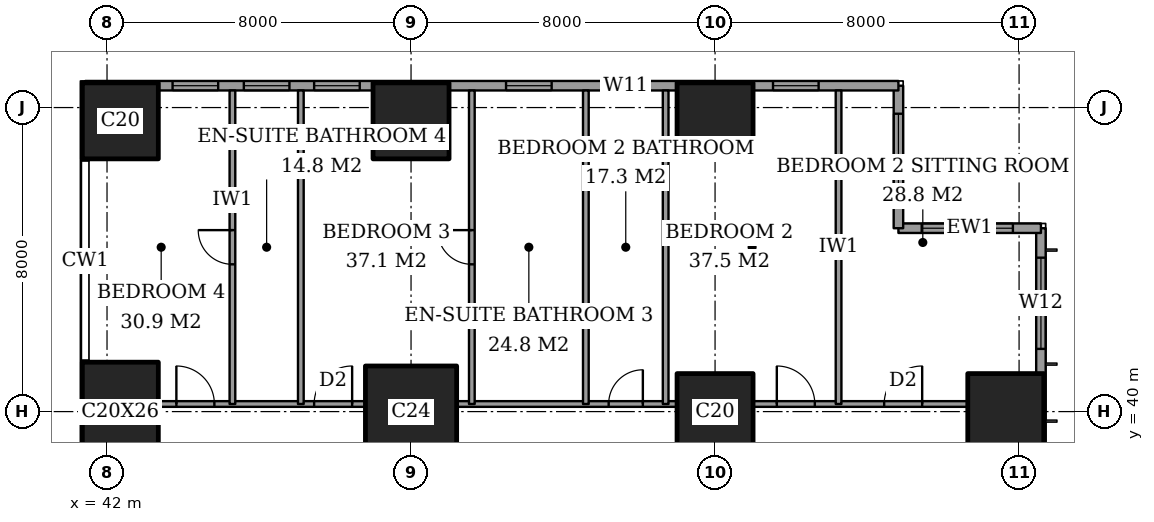
"""IFC4 building model, lengths in metres.
Left out: names, types, materials, properties, quantities, classifications, styles, units other than length and angle.
Written with IfcOpenShell. Run it as: python <this file> out.ifc"""

import sys

from ifc_helpers import new_model, si_unit, direction, frame, frame_2d, origin, origin_2d, place, context, subcontext, project, spatial, rectangle, extrude, element, fill, save


model = new_model("IFC4")
c1 = context("Model", 3, precision=1e-05, world=origin(), true_north=direction((0.0, 1.0)))
c2 = subcontext(c1, "Body", "Model", "MODEL_VIEW")
j1 = project(units=[si_unit("LENGTHUNIT", "METRE"), si_unit("PLANEANGLEUNIT", "RADIAN")], contexts=[c1])
p1 = place(None, origin())
s1 = spatial("IfcSite", under=j1, at=p1, CompositionType="ELEMENT")
p2 = place(p1, origin())
s2 = spatial("IfcBuilding", under=s1, at=p2, CompositionType="ELEMENT")
p3 = place(p2, frame((0.0, 0.0, 157.4)))
s3 = spatial("IfcBuildingStorey", under=s2, at=p3, CompositionType="ELEMENT", Elevation=157.4)
p4 = place(p3, frame((42.35, 40.0, 0.0), z_axis=(0.0, 0.0, 1.0), x_axis=(1.0, 0.0, 0.0)))
e1 = element("IfcColumn", 1, at=p4, inside=s3, PredefinedType="COLUMN", context=c2, shape_type="SweptSolid", body=[
    extrude(rectangle(XDim=2.0, YDim=2.6, at=origin_2d()), origin(), (0.0, 0.0, 1.0), 3.6),
])
p5 = place(p3, frame((42.35, 47.65, 0.0), z_axis=(0.0, 0.0, 1.0), x_axis=(1.0, 0.0, 0.0)))
e2 = element("IfcColumn", 2, at=p5, inside=s3, PredefinedType="COLUMN", context=c2, shape_type="SweptSolid", body=[
    extrude(rectangle(XDim=2.0, YDim=2.0, at=origin_2d()), origin(), (0.0, 0.0, 1.0), 3.6),
])
p6 = place(p3, frame((50.0, 40.0, 0.0), z_axis=(0.0, 0.0, 1.0), x_axis=(1.0, 0.0, 0.0)))
e3 = element("IfcColumn", 3, at=p6, inside=s3, PredefinedType="COLUMN", context=c2, shape_type="SweptSolid", body=[
    extrude(rectangle(XDim=2.4, YDim=2.4, at=origin_2d()), origin(), (0.0, 0.0, 1.0), 3.6),
])
for number, where, z_axis, x_axis in (
    (4, (50.0, 47.65, 0.0), (0.0, 0.0, 1.0), (1.0, 0.0, 0.0)),
    (5, (58.0, 40.0, 0.0), (0.0, 0.0, 1.0), (1.0, 0.0, 0.0)),
    (6, (58.0, 47.65, 0.0), (0.0, 0.0, 1.0), (1.0, 0.0, 0.0)),
    (7, (65.65, 40.0, 0.0), (0.0, 0.0, 1.0), (1.0, 0.0, 0.0)),
):
    element("IfcColumn", number, at=place(p3, frame(where, z_axis=z_axis, x_axis=x_axis)), inside=s3, PredefinedType="COLUMN", context=c2, shape_type="SweptSolid", body=[
        extrude(rectangle(XDim=2.0, YDim=2.0, at=origin_2d()), origin(), (0.0, 0.0, 1.0), 3.6),
    ])
p7 = place(p3, frame((66.575, 3.175, 0.0), z_axis=(0.0, 0.0, 1.0), x_axis=(0.0, 1.0, 0.0)))
e8 = element("IfcWall", 8, at=p7, inside=s3, PredefinedType="SOLIDWALL", context=c2, shape_type="SweptSolid", body=[
    extrude(rectangle(XDim=41.65, YDim=0.25, at=frame_2d((20.825, 0.0))), origin(), (0.0, 0.0, 1.0), 3.6),
])
p8 = place(p7, frame((0.775, 0.0, 0.4)))
e9 = element("IfcOpeningElement", 9, at=p8, cuts=e8, PredefinedType="OPENING", context=c2, shape_type="SweptSolid", body=[
    extrude(rectangle(XDim=2.4, YDim=2.2, at=frame_2d((1.2, 1.1))), frame((0.0, 0.135, 0.0), z_axis=(0.0, -1.0, 0.0), x_axis=(1.0, 0.0, 0.0)), (0.0, 0.0, 1.0), 0.27),
])
p9 = place(p7, frame((6.225, 0.0, 0.4)))
e10 = element("IfcOpeningElement", 10, at=p9, cuts=e8, PredefinedType="OPENING", context=c2, shape_type="SweptSolid", body=[
    extrude(rectangle(XDim=1.2, YDim=2.2, at=frame_2d((0.6, 1.1))), frame((0.0, 0.135, 0.0), z_axis=(0.0, -1.0, 0.0), x_axis=(1.0, 0.0, 0.0)), (0.0, 0.0, 1.0), 0.27),
])
p10 = place(p7, frame((8.475, 0.0, 0.4)))
e11 = element("IfcOpeningElement", 11, at=p10, cuts=e8, PredefinedType="OPENING", context=c2, shape_type="SweptSolid", body=[
    extrude(rectangle(XDim=2.4, YDim=2.2, at=frame_2d((1.2, 1.1))), frame((0.0, 0.135, 0.0), z_axis=(0.0, -1.0, 0.0), x_axis=(1.0, 0.0, 0.0)), (0.0, 0.0, 1.0), 0.27),
])
p11 = place(p7, frame((15.775, 0.0, 0.4)))
e12 = element("IfcOpeningElement", 12, at=p11, cuts=e8, PredefinedType="OPENING", context=c2, shape_type="SweptSolid", body=[
    extrude(rectangle(XDim=2.4, YDim=2.2, at=frame_2d((1.2, 1.1))), frame((0.0, 0.135, 0.0), z_axis=(0.0, -1.0, 0.0), x_axis=(1.0, 0.0, 0.0)), (0.0, 0.0, 1.0), 0.27),
])
p12 = place(p7, frame((23.475, 0.0, 0.4)))
e13 = element("IfcOpeningElement", 13, at=p12, cuts=e8, PredefinedType="OPENING", context=c2, shape_type="SweptSolid", body=[
    extrude(rectangle(XDim=2.4, YDim=2.2, at=frame_2d((1.2, 1.1))), frame((0.0, 0.135, 0.0), z_axis=(0.0, -1.0, 0.0), x_axis=(1.0, 0.0, 0.0)), (0.0, 0.0, 1.0), 0.27),
])
p13 = place(p7, frame((30.975, 0.0, 0.4)))
e14 = element("IfcOpeningElement", 14, at=p13, cuts=e8, PredefinedType="OPENING", context=c2, shape_type="SweptSolid", body=[
    extrude(rectangle(XDim=2.4, YDim=2.2, at=frame_2d((1.2, 1.1))), frame((0.0, 0.135, 0.0), z_axis=(0.0, -1.0, 0.0), x_axis=(1.0, 0.0, 0.0)), (0.0, 0.0, 1.0), 0.27),
])
p14 = place(p7, frame((34.5, 0.0, 0.4)))
e15 = element("IfcOpeningElement", 15, at=p14, cuts=e8, PredefinedType="OPENING", context=c2, shape_type="SweptSolid", body=[
    extrude(rectangle(XDim=1.2, YDim=2.2, at=frame_2d((0.6, 1.1))), frame((0.0, 0.135, 0.0), z_axis=(0.0, -1.0, 0.0), x_axis=(1.0, 0.0, 0.0)), (0.0, 0.0, 1.0), 0.27),
])
p15 = place(p7, frame((38.475, 0.0, 0.4)))
e16 = element("IfcOpeningElement", 16, at=p15, cuts=e8, PredefinedType="OPENING", context=c2, shape_type="SweptSolid", body=[
    extrude(rectangle(XDim=2.4, YDim=2.2, at=frame_2d((1.2, 1.1))), frame((0.0, 0.135, 0.0), z_axis=(0.0, -1.0, 0.0), x_axis=(1.0, 0.0, 0.0)), (0.0, 0.0, 1.0), 0.27),
])
p16 = place(p3, frame((66.575, 44.825, 0.0), z_axis=(0.0, 0.0, 1.0), x_axis=(-1.0, 0.0, 0.0)))
e17 = element("IfcWall", 17, at=p16, inside=s3, PredefinedType="SOLIDWALL", context=c2, shape_type="SweptSolid", body=[
    extrude(rectangle(XDim=3.75, YDim=0.25, at=frame_2d((1.875, 0.0))), origin(), (0.0, 0.0, 1.0), 3.6),
])
p17 = place(p16, frame((0.738, 0.0, 0.4)))
e18 = element("IfcOpeningElement", 18, at=p17, cuts=e17, PredefinedType="OPENING", context=c2, shape_type="SweptSolid", body=[
    extrude(rectangle(XDim=2.4, YDim=2.2, at=frame_2d((1.2, 1.1))), frame((0.0, 0.135, 0.0), z_axis=(0.0, -1.0, 0.0), x_axis=(1.0, 0.0, 0.0)), (0.0, 0.0, 1.0), 0.27),
])
p18 = place(p3, frame((62.825, 44.825, 0.0), z_axis=(0.0, 0.0, 1.0), x_axis=(0.0, 1.0, 0.0)))
e19 = element("IfcWall", 19, at=p18, inside=s3, PredefinedType="SOLIDWALL", context=c2, shape_type="SweptSolid", body=[
    extrude(rectangle(XDim=3.75, YDim=0.25, at=frame_2d((1.875, 0.0))), origin(), (0.0, 0.0, 1.0), 3.6),
])
p19 = place(p18, frame((0.613, 0.0, 0.4)))
e20 = element("IfcOpeningElement", 20, at=p19, cuts=e19, PredefinedType="OPENING", context=c2, shape_type="SweptSolid", body=[
    extrude(rectangle(XDim=2.4, YDim=2.2, at=frame_2d((1.2, 1.1))), frame((0.0, 0.135, 0.0), z_axis=(0.0, -1.0, 0.0), x_axis=(1.0, 0.0, 0.0)), (0.0, 0.0, 1.0), 0.27),
])
p20 = place(p3, frame((62.825, 48.575, 0.0), z_axis=(0.0, 0.0, 1.0), x_axis=(-1.0, 0.0, 0.0)))
e21 = element("IfcWall", 21, at=p20, inside=s3, PredefinedType="SOLIDWALL", context=c2, shape_type="SweptSolid", body=[
    extrude(rectangle(XDim=21.4, YDim=0.25, at=frame_2d((10.7, 0.0))), origin(), (0.0, 0.0, 1.0), 3.6),
])
p21 = place(p20, frame((2.1, 0.0, 0.4)))
e22 = element("IfcOpeningElement", 22, at=p21, cuts=e21, PredefinedType="OPENING", context=c2, shape_type="SweptSolid", body=[
    extrude(rectangle(XDim=1.2, YDim=2.2, at=frame_2d((0.6, 1.1))), frame((0.0, 0.135, 0.0), z_axis=(0.0, -1.0, 0.0), x_axis=(1.0, 0.0, 0.0)), (0.0, 0.0, 1.0), 0.27),
])
p22 = place(p20, frame((6.575, 0.0, 0.4)))
e23 = element("IfcOpeningElement", 23, at=p22, cuts=e21, PredefinedType="OPENING", context=c2, shape_type="SweptSolid", body=[
    extrude(rectangle(XDim=1.2, YDim=2.2, at=frame_2d((0.6, 1.1))), frame((0.0, 0.135, 0.0), z_axis=(0.0, -1.0, 0.0), x_axis=(1.0, 0.0, 0.0)), (0.0, 0.0, 1.0), 0.27),
])
p23 = place(p20, frame((9.125, 0.0, 0.4)))
e24 = element("IfcOpeningElement", 24, at=p23, cuts=e21, PredefinedType="OPENING", context=c2, shape_type="SweptSolid", body=[
    extrude(rectangle(XDim=1.2, YDim=2.2, at=frame_2d((0.6, 1.1))), frame((0.0, 0.135, 0.0), z_axis=(0.0, -1.0, 0.0), x_axis=(1.0, 0.0, 0.0)), (0.0, 0.0, 1.0), 0.27),
])
p24 = place(p20, frame((14.175, 0.0, 0.4)))
e25 = element("IfcOpeningElement", 25, at=p24, cuts=e21, PredefinedType="OPENING", context=c2, shape_type="SweptSolid", body=[
    extrude(rectangle(XDim=1.2, YDim=2.2, at=frame_2d((0.6, 1.1))), frame((0.0, 0.135, 0.0), z_axis=(0.0, -1.0, 0.0), x_axis=(1.0, 0.0, 0.0)), (0.0, 0.0, 1.0), 0.27),
])
p25 = place(p20, frame((16.025, 0.0, 0.4)))
e26 = element("IfcOpeningElement", 26, at=p25, cuts=e21, PredefinedType="OPENING", context=c2, shape_type="SweptSolid", body=[
    extrude(rectangle(XDim=1.2, YDim=2.2, at=frame_2d((0.6, 1.1))), frame((0.0, 0.135, 0.0), z_axis=(0.0, -1.0, 0.0), x_axis=(1.0, 0.0, 0.0)), (0.0, 0.0, 1.0), 0.27),
])
p26 = place(p20, frame((17.9, 0.0, 0.4)))
e27 = element("IfcOpeningElement", 27, at=p26, cuts=e21, PredefinedType="OPENING", context=c2, shape_type="SweptSolid", body=[
    extrude(rectangle(XDim=1.2, YDim=2.2, at=frame_2d((0.6, 1.1))), frame((0.0, 0.135, 0.0), z_axis=(0.0, -1.0, 0.0), x_axis=(1.0, 0.0, 0.0)), (0.0, 0.0, 1.0), 0.27),
])
p27 = place(p3, frame((43.35, 40.2, 0.0), z_axis=(0.0, 0.0, 1.0), x_axis=(1.0, 0.0, 0.0)))
e28 = element("IfcWall", 28, at=p27, inside=s3, PredefinedType="PARTITIONING", context=c2, shape_type="SweptSolid", body=[
    extrude(rectangle(XDim=5.45, YDim=0.15, at=frame_2d((2.725, 0.0))), origin(), (0.0, 0.0, 1.0), 3.35),
])
p28 = place(p27, frame((4.1, 0.0, 0.0)))
e29 = element("IfcOpeningElement", 29, at=p28, cuts=e28, PredefinedType="OPENING", context=c2, shape_type="SweptSolid", body=[
    extrude(rectangle(XDim=1.0, YDim=2.1, at=frame_2d((0.5, 1.05))), frame((0.0, 0.085, 0.0), z_axis=(0.0, -1.0, 0.0), x_axis=(1.0, 0.0, 0.0)), (0.0, 0.0, 1.0), 0.17),
])
p29 = place(p27, frame((0.475, 0.0, 0.0)))
e30 = element("IfcOpeningElement", 30, at=p29, cuts=e28, PredefinedType="OPENING", context=c2, shape_type="SweptSolid", body=[
    extrude(rectangle(XDim=1.0, YDim=2.1, at=frame_2d((0.5, 1.05))), frame((0.0, 0.085, 0.0), z_axis=(0.0, -1.0, 0.0), x_axis=(1.0, 0.0, 0.0)), (0.0, 0.0, 1.0), 0.17),
])
p30 = place(p3, frame((51.2, 40.2, 0.0), z_axis=(0.0, 0.0, 1.0), x_axis=(1.0, 0.0, 0.0)))
e31 = element("IfcWall", 31, at=p30, inside=s3, PredefinedType="PARTITIONING", context=c2, shape_type="SweptSolid", body=[
    extrude(rectangle(XDim=5.8, YDim=0.15, at=frame_2d((2.9, 0.0))), origin(), (0.0, 0.0, 1.0), 3.35),
])
p31 = place(p30, frame((4.0, 0.0, 0.0)))
e32 = element("IfcOpeningElement", 32, at=p31, cuts=e31, PredefinedType="OPENING", context=c2, shape_type="SweptSolid", body=[
    extrude(rectangle(XDim=0.9, YDim=2.1, at=frame_2d((0.45, 1.05))), frame((0.0, 0.085, 0.0), z_axis=(0.0, -1.0, 0.0), x_axis=(1.0, 0.0, 0.0)), (0.0, 0.0, 1.0), 0.17),
])
p32 = place(p3, frame((59.0, 40.2, 0.0), z_axis=(0.0, 0.0, 1.0), x_axis=(1.0, 0.0, 0.0)))
e33 = element("IfcWall", 33, at=p32, inside=s3, PredefinedType="PARTITIONING", context=c2, shape_type="SweptSolid", body=[
    extrude(rectangle(XDim=5.65, YDim=0.15, at=frame_2d((2.825, 0.0))), origin(), (0.0, 0.0, 1.0), 3.35),
])
p33 = place(p32, frame((3.45, 0.0, 0.0)))
e34 = element("IfcOpeningElement", 34, at=p33, cuts=e33, PredefinedType="OPENING", context=c2, shape_type="SweptSolid", body=[
    extrude(rectangle(XDim=1.0, YDim=2.1, at=frame_2d((0.5, 1.05))), frame((0.0, 0.085, 0.0), z_axis=(0.0, -1.0, 0.0), x_axis=(1.0, 0.0, 0.0)), (0.0, 0.0, 1.0), 0.17),
])
p34 = place(p32, frame((0.625, 0.0, 0.0)))
e35 = element("IfcOpeningElement", 35, at=p34, cuts=e33, PredefinedType="OPENING", context=c2, shape_type="SweptSolid", body=[
    extrude(rectangle(XDim=1.0, YDim=2.1, at=frame_2d((0.5, 1.05))), frame((0.0, 0.085, 0.0), z_axis=(0.0, -1.0, 0.0), x_axis=(1.0, 0.0, 0.0)), (0.0, 0.0, 1.0), 0.17),
])
p35 = place(p3, frame((45.3, 40.2, 0.0), z_axis=(0.0, 0.0, 1.0), x_axis=(0.0, 1.0, 0.0)))
e36 = element("IfcWall", 36, at=p35, inside=s3, PredefinedType="PARTITIONING", context=c2, shape_type="SweptSolid", body=[
    extrude(rectangle(XDim=8.25, YDim=0.15, at=frame_2d((4.125, 0.0))), origin(), (0.0, 0.0, 1.0), 3.35),
])
p36 = place(p35, frame((3.675, 0.0, 0.0)))
e37 = element("IfcOpeningElement", 37, at=p36, cuts=e36, PredefinedType="OPENING", context=c2, shape_type="SweptSolid", body=[
    extrude(rectangle(XDim=0.9, YDim=2.1, at=frame_2d((0.45, 1.05))), frame((0.0, 0.085, 0.0), z_axis=(0.0, -1.0, 0.0), x_axis=(1.0, 0.0, 0.0)), (0.0, 0.0, 1.0), 0.17),
])
p37 = place(p3, frame((47.1, 40.2, 0.0), z_axis=(0.0, 0.0, 1.0), x_axis=(0.0, 1.0, 0.0)))
e38 = element("IfcWall", 38, at=p37, inside=s3, PredefinedType="PARTITIONING", context=c2, shape_type="SweptSolid", body=[
    extrude(rectangle(XDim=8.25, YDim=0.15, at=frame_2d((4.125, 0.0))), origin(), (0.0, 0.0, 1.0), 3.35),
])
p38 = place(p3, frame((51.6, 40.2, 0.0), z_axis=(0.0, 0.0, 1.0), x_axis=(0.0, 1.0, 0.0)))
e39 = element("IfcWall", 39, at=p38, inside=s3, PredefinedType="PARTITIONING", context=c2, shape_type="SweptSolid", body=[
    extrude(rectangle(XDim=8.25, YDim=0.15, at=frame_2d((4.125, 0.0))), origin(), (0.0, 0.0, 1.0), 3.35),
])
p39 = place(p38, frame((3.675, 0.0, 0.0)))
e40 = element("IfcOpeningElement", 40, at=p39, cuts=e39, PredefinedType="OPENING", context=c2, shape_type="SweptSolid", body=[
    extrude(rectangle(XDim=0.9, YDim=2.1, at=frame_2d((0.45, 1.05))), frame((0.0, 0.085, 0.0), z_axis=(0.0, -1.0, 0.0), x_axis=(1.0, 0.0, 0.0)), (0.0, 0.0, 1.0), 0.17),
])
for number, where, z_axis, x_axis in (
    (41, (54.6, 40.2, 0.0), (0.0, 0.0, 1.0), (0.0, 1.0, 0.0)),
    (42, (56.7, 40.2, 0.0), (0.0, 0.0, 1.0), (0.0, 1.0, 0.0)),
    (43, (61.25, 40.2, 0.0), (0.0, 0.0, 1.0), (0.0, 1.0, 0.0)),
):
    element("IfcWall", number, at=place(p3, frame(where, z_axis=z_axis, x_axis=x_axis)), inside=s3, PredefinedType="PARTITIONING", context=c2, shape_type="SweptSolid", body=[
        extrude(rectangle(XDim=8.25, YDim=0.15, at=frame_2d((4.125, 0.0))), origin(), (0.0, 0.0, 1.0), 3.35),
    ])
p40 = place(p15, origin())
e44 = element("IfcWindow", 44, at=p40, inside=s3, PartitioningType="SINGLE_PANEL", PredefinedType="WINDOW", context=c2, shape_type="SweptSolid", body=[
    extrude(rectangle(XDim=2.4, YDim=2.2, at=frame_2d((1.2, 1.1))), frame((0.0, 0.03, 0.0), z_axis=(0.0, -1.0, 0.0), x_axis=(1.0, 0.0, 0.0)), (0.0, 0.0, 1.0), 0.06),
])
fill(e16, e44)
p41 = place(p17, origin())
e45 = element("IfcWindow", 45, at=p41, inside=s3, PartitioningType="SINGLE_PANEL", PredefinedType="WINDOW", context=c2, shape_type="SweptSolid", body=[
    extrude(rectangle(XDim=2.4, YDim=2.2, at=frame_2d((1.2, 1.1))), frame((0.0, 0.03, 0.0), z_axis=(0.0, -1.0, 0.0), x_axis=(1.0, 0.0, 0.0)), (0.0, 0.0, 1.0), 0.06),
])
fill(e18, e45)
p42 = place(p19, origin())
e46 = element("IfcWindow", 46, at=p42, inside=s3, PartitioningType="SINGLE_PANEL", PredefinedType="WINDOW", context=c2, shape_type="SweptSolid", body=[
    extrude(rectangle(XDim=2.4, YDim=2.2, at=frame_2d((1.2, 1.1))), frame((0.0, 0.03, 0.0), z_axis=(0.0, -1.0, 0.0), x_axis=(1.0, 0.0, 0.0)), (0.0, 0.0, 1.0), 0.06),
])
fill(e20, e46)
p43 = place(p21, origin())
e47 = element("IfcWindow", 47, at=p43, inside=s3, PartitioningType="SINGLE_PANEL", PredefinedType="WINDOW", context=c2, shape_type="SweptSolid", body=[
    extrude(rectangle(XDim=1.2, YDim=2.2, at=frame_2d((0.6, 1.1))), frame((0.0, 0.03, 0.0), z_axis=(0.0, -1.0, 0.0), x_axis=(1.0, 0.0, 0.0)), (0.0, 0.0, 1.0), 0.06),
])
fill(e22, e47)
p44 = place(p22, origin())
e48 = element("IfcWindow", 48, at=p44, inside=s3, PartitioningType="SINGLE_PANEL", PredefinedType="WINDOW", context=c2, shape_type="SweptSolid", body=[
    extrude(rectangle(XDim=1.2, YDim=2.2, at=frame_2d((0.6, 1.1))), frame((0.0, 0.03, 0.0), z_axis=(0.0, -1.0, 0.0), x_axis=(1.0, 0.0, 0.0)), (0.0, 0.0, 1.0), 0.06),
])
fill(e23, e48)
p45 = place(p23, origin())
e49 = element("IfcWindow", 49, at=p45, inside=s3, PartitioningType="SINGLE_PANEL", PredefinedType="WINDOW", context=c2, shape_type="SweptSolid", body=[
    extrude(rectangle(XDim=1.2, YDim=2.2, at=frame_2d((0.6, 1.1))), frame((0.0, 0.03, 0.0), z_axis=(0.0, -1.0, 0.0), x_axis=(1.0, 0.0, 0.0)), (0.0, 0.0, 1.0), 0.06),
])
fill(e24, e49)
p46 = place(p24, origin())
e50 = element("IfcWindow", 50, at=p46, inside=s3, PartitioningType="SINGLE_PANEL", PredefinedType="WINDOW", context=c2, shape_type="SweptSolid", body=[
    extrude(rectangle(XDim=1.2, YDim=2.2, at=frame_2d((0.6, 1.1))), frame((0.0, 0.03, 0.0), z_axis=(0.0, -1.0, 0.0), x_axis=(1.0, 0.0, 0.0)), (0.0, 0.0, 1.0), 0.06),
])
fill(e25, e50)
p47 = place(p25, origin())
e51 = element("IfcWindow", 51, at=p47, inside=s3, PartitioningType="SINGLE_PANEL", PredefinedType="WINDOW", context=c2, shape_type="SweptSolid", body=[
    extrude(rectangle(XDim=1.2, YDim=2.2, at=frame_2d((0.6, 1.1))), frame((0.0, 0.03, 0.0), z_axis=(0.0, -1.0, 0.0), x_axis=(1.0, 0.0, 0.0)), (0.0, 0.0, 1.0), 0.06),
])
fill(e26, e51)
p48 = place(p26, origin())
e52 = element("IfcWindow", 52, at=p48, inside=s3, PartitioningType="SINGLE_PANEL", PredefinedType="WINDOW", context=c2, shape_type="SweptSolid", body=[
    extrude(rectangle(XDim=1.2, YDim=2.2, at=frame_2d((0.6, 1.1))), frame((0.0, 0.03, 0.0), z_axis=(0.0, -1.0, 0.0), x_axis=(1.0, 0.0, 0.0)), (0.0, 0.0, 1.0), 0.06),
])
fill(e27, e52)
p49 = place(p33, origin())
e53 = element("IfcDoor", 53, at=p49, inside=s3, OperationType="SINGLE_SWING_LEFT", PredefinedType="DOOR", context=c2, shape_type="SweptSolid", body=[
    extrude(rectangle(XDim=1.0, YDim=2.1, at=frame_2d((0.5, 1.05))), frame((0.0, 0.025, 0.0), z_axis=(0.0, -1.0, 0.0), x_axis=(1.0, 0.0, 0.0)), (0.0, 0.0, 1.0), 0.05),
])
fill(e34, e53)
p50 = place(p34, origin())
e54 = element("IfcDoor", 54, at=p50, inside=s3, OperationType="SINGLE_SWING_RIGHT", PredefinedType="DOOR", context=c2, shape_type="SweptSolid", body=[
    extrude(rectangle(XDim=1.0, YDim=2.1, at=frame_2d((0.5, 1.05))), frame((0.0, 0.025, 0.0), z_axis=(0.0, -1.0, 0.0), x_axis=(1.0, 0.0, 0.0)), (0.0, 0.0, 1.0), 0.05),
])
fill(e35, e54)
p51 = place(p31, origin())
e55 = element("IfcDoor", 55, at=p51, inside=s3, OperationType="SINGLE_SWING_LEFT", PredefinedType="DOOR", context=c2, shape_type="SweptSolid", body=[
    extrude(rectangle(XDim=0.9, YDim=2.1, at=frame_2d((0.45, 1.05))), frame((0.0, 0.025, 0.0), z_axis=(0.0, -1.0, 0.0), x_axis=(1.0, 0.0, 0.0)), (0.0, 0.0, 1.0), 0.05),
])
fill(e32, e55)
p52 = place(p39, origin())
e56 = element("IfcDoor", 56, at=p52, inside=s3, OperationType="SINGLE_SWING_LEFT", PredefinedType="DOOR", context=c2, shape_type="SweptSolid", body=[
    extrude(rectangle(XDim=0.9, YDim=2.1, at=frame_2d((0.45, 1.05))), frame((0.0, 0.025, 0.0), z_axis=(0.0, -1.0, 0.0), x_axis=(1.0, 0.0, 0.0)), (0.0, 0.0, 1.0), 0.05),
])
fill(e40, e56)
p53 = place(p28, origin())
e57 = element("IfcDoor", 57, at=p53, inside=s3, OperationType="SINGLE_SWING_LEFT", PredefinedType="DOOR", context=c2, shape_type="SweptSolid", body=[
    extrude(rectangle(XDim=1.0, YDim=2.1, at=frame_2d((0.5, 1.05))), frame((0.0, 0.025, 0.0), z_axis=(0.0, -1.0, 0.0), x_axis=(1.0, 0.0, 0.0)), (0.0, 0.0, 1.0), 0.05),
])
fill(e29, e57)
p54 = place(p36, origin())
e58 = element("IfcDoor", 58, at=p54, inside=s3, OperationType="SINGLE_SWING_LEFT", PredefinedType="DOOR", context=c2, shape_type="SweptSolid", body=[
    extrude(rectangle(XDim=0.9, YDim=2.1, at=frame_2d((0.45, 1.05))), frame((0.0, 0.025, 0.0), z_axis=(0.0, -1.0, 0.0), x_axis=(1.0, 0.0, 0.0)), (0.0, 0.0, 1.0), 0.05),
])
fill(e37, e58)
p55 = place(p29, origin())
e59 = element("IfcDoor", 59, at=p55, inside=s3, OperationType="SINGLE_SWING_RIGHT", PredefinedType="DOOR", context=c2, shape_type="SweptSolid", body=[
    extrude(rectangle(XDim=1.0, YDim=2.1, at=frame_2d((0.5, 1.05))), frame((0.0, 0.025, 0.0), z_axis=(0.0, -1.0, 0.0), x_axis=(1.0, 0.0, 0.0)), (0.0, 0.0, 1.0), 0.05),
])
fill(e30, e59)
save(model, sys.argv[1])
